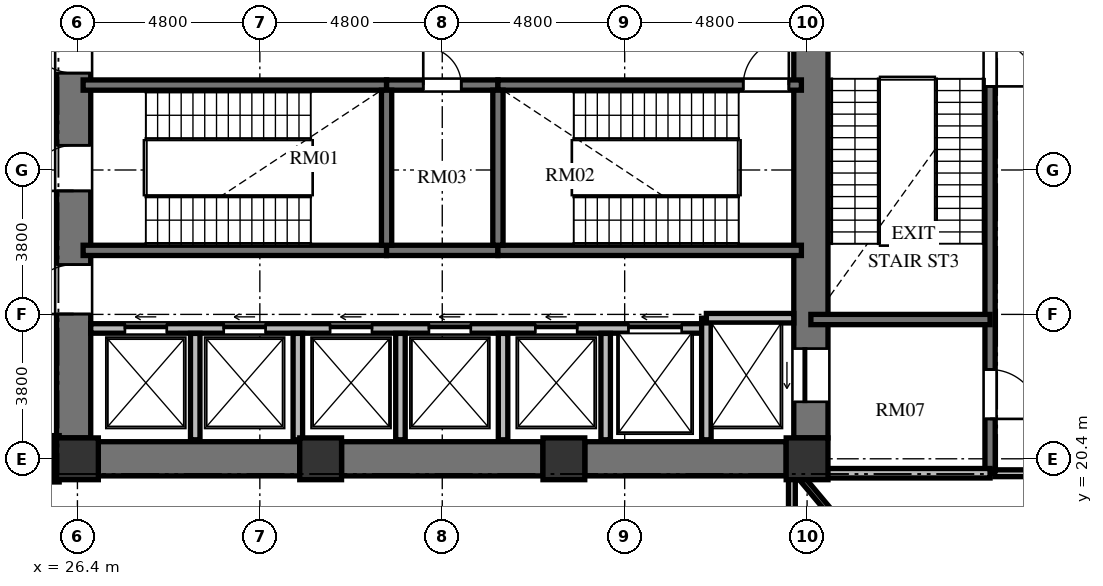
"""IFC4 building model, lengths in metres.
Left out: names, types, materials, properties, quantities, classifications, styles, units other than length and angle.
Written with IfcOpenShell. Run it as: python <this file> out.ifc"""

import sys

from ifc_helpers import new_model, si_unit, direction, frame, frame_2d, origin, origin_2d, place, context, subcontext, project, spatial, rectangle, extrude, element, fill, save


model = new_model("IFC4")
c1 = context("Model", 3, precision=1e-05, world=origin(), true_north=direction((0.0, 1.0)))
c2 = subcontext(c1, "Body", "Model", "MODEL_VIEW")
j1 = project(units=[si_unit("LENGTHUNIT", "METRE"), si_unit("PLANEANGLEUNIT", "RADIAN")], contexts=[c1])
p1 = place(None, origin())
s1 = spatial("IfcSite", under=j1, at=p1, CompositionType="ELEMENT")
p2 = place(p1, origin())
s2 = spatial("IfcBuilding", under=s1, at=p2, CompositionType="ELEMENT")
p3 = place(p2, frame((0.0, 0.0, 15.6)))
s3 = spatial("IfcBuildingStorey", under=s2, at=p3, CompositionType="ELEMENT", Elevation=15.6)
for number, where, z_axis, x_axis in (
    (1, (26.4, 20.4, 0.0), (0.0, 0.0, 1.0), (1.0, 0.0, 0.0)),
    (2, (32.8, 20.4, 0.0), (0.0, 0.0, 1.0), (1.0, 0.0, 0.0)),
    (3, (39.2, 20.4, 0.0), (0.0, 0.0, 1.0), (1.0, 0.0, 0.0)),
    (4, (45.6, 20.4, 0.0), (0.0, 0.0, 1.0), (1.0, 0.0, 0.0)),
):
    element("IfcColumn", number, at=place(p3, frame(where, z_axis=z_axis, x_axis=x_axis)), inside=s3, PredefinedType="COLUMN", context=c2, shape_type="SweptSolid", body=[
        extrude(rectangle(XDim=1.1, YDim=1.1, at=origin_2d()), origin(), (0.0, 0.0, 1.0), 4.8),
    ])
p4 = place(p3, frame((26.3, 20.95, 0.0), z_axis=(0.0, 0.0, 1.0), x_axis=(0.0, 1.0, 0.0)))
e5 = element("IfcWall", 5, at=p4, inside=s3, PredefinedType="SHEAR", context=c2, shape_type="SweptSolid", body=[
    extrude(rectangle(XDim=14.1, YDim=0.9, at=frame_2d((7.05, 0.0))), origin(), (0.0, 0.0, 1.0), 4.8),
])
p5 = place(p4, frame((6.5, 0.0, 0.0)))
e6 = element("IfcOpeningElement", 6, at=p5, cuts=e5, PredefinedType="OPENING", context=c2, shape_type="SweptSolid", body=[
    extrude(rectangle(XDim=1.2, YDim=2.15, at=frame_2d((0.6, 1.075))), frame((0.0, 0.46, 0.0), z_axis=(0.0, -1.0, 0.0), x_axis=(1.0, 0.0, 0.0)), (0.0, 0.0, 1.0), 0.92),
])
p6 = place(p4, frame((9.6, 0.0, 0.0)))
e7 = element("IfcOpeningElement", 7, at=p6, cuts=e5, PredefinedType="OPENING", context=c2, shape_type="SweptSolid", body=[
    extrude(rectangle(XDim=1.3, YDim=2.2, at=frame_2d((0.65, 1.1))), frame((0.0, 0.46, 0.0), z_axis=(0.0, -1.0, 0.0), x_axis=(1.0, 0.0, 0.0)), (0.0, 0.0, 1.0), 0.92),
])
p7 = place(p4, frame((3.26, 0.0, 0.0)))
e8 = element("IfcOpeningElement", 8, at=p7, cuts=e5, PredefinedType="OPENING", context=c2, shape_type="SweptSolid", body=[
    extrude(rectangle(XDim=1.3, YDim=2.2, at=frame_2d((0.65, 1.1))), frame((0.0, 0.46, 0.0), z_axis=(0.0, -1.0, 0.0), x_axis=(1.0, 0.0, 0.0)), (0.0, 0.0, 1.0), 0.92),
])
p8 = place(p3, frame((45.7, 20.95, 0.0), z_axis=(0.0, 0.0, 1.0), x_axis=(0.0, 1.0, 0.0)))
e9 = element("IfcWall", 9, at=p8, inside=s3, PredefinedType="SHEAR", context=c2, shape_type="SweptSolid", body=[
    extrude(rectangle(XDim=14.1, YDim=0.9, at=frame_2d((7.05, 0.0))), origin(), (0.0, 0.0, 1.0), 4.8),
])
p9 = place(p8, frame((11.75, 0.0, 0.0)))
e10 = element("IfcOpeningElement", 10, at=p9, cuts=e9, PredefinedType="OPENING", context=c2, shape_type="SweptSolid", body=[
    extrude(rectangle(XDim=1.4, YDim=2.3, at=frame_2d((0.7, 1.15))), frame((0.0, 0.46, 0.0), z_axis=(0.0, -1.0, 0.0), x_axis=(1.0, 0.0, 0.0)), (0.0, 0.0, 1.0), 0.92),
])
p10 = place(p8, frame((0.95, 0.0, 0.0)))
e11 = element("IfcOpeningElement", 11, at=p10, cuts=e9, PredefinedType="OPENING", context=c2, shape_type="SweptSolid", body=[
    extrude(rectangle(XDim=1.4, YDim=2.3, at=frame_2d((0.7, 1.15))), frame((0.0, 0.46, 0.0), z_axis=(0.0, -1.0, 0.0), x_axis=(1.0, 0.0, 0.0)), (0.0, 0.0, 1.0), 0.92),
])
p11 = place(p3, frame((26.95, 20.4, 0.0), z_axis=(0.0, 0.0, 1.0), x_axis=(1.0, 0.0, 0.0)))
e12 = element("IfcWall", 12, at=p11, inside=s3, PredefinedType="SHEAR", context=c2, shape_type="SweptSolid", body=[
    extrude(rectangle(XDim=5.3, YDim=0.9, at=frame_2d((2.65, 0.0))), origin(), (0.0, 0.0, 1.0), 4.8),
])
p12 = place(p3, frame((33.35, 20.4, 0.0), z_axis=(0.0, 0.0, 1.0), x_axis=(1.0, 0.0, 0.0)))
e13 = element("IfcWall", 13, at=p12, inside=s3, PredefinedType="SHEAR", context=c2, shape_type="SweptSolid", body=[
    extrude(rectangle(XDim=5.3, YDim=0.9, at=frame_2d((2.65, 0.0))), origin(), (0.0, 0.0, 1.0), 4.8),
])
p13 = place(p3, frame((39.75, 20.4, 0.0), z_axis=(0.0, 0.0, 1.0), x_axis=(1.0, 0.0, 0.0)))
e14 = element("IfcWall", 14, at=p13, inside=s3, PredefinedType="SHEAR", context=c2, shape_type="SweptSolid", body=[
    extrude(rectangle(XDim=5.3, YDim=0.9, at=frame_2d((2.65, 0.0))), origin(), (0.0, 0.0, 1.0), 4.8),
])
p14 = place(p3, frame((26.55, 30.235, 0.0), z_axis=(0.0, 0.0, 1.0), x_axis=(1.0, 0.0, 0.0)))
e15 = element("IfcWall", 15, at=p14, inside=s3, PredefinedType="SHEAR", context=c2, shape_type="SweptSolid", body=[
    extrude(rectangle(XDim=7.985, YDim=0.27, at=frame_2d((3.992, 0.0))), origin(), (0.0, 0.0, 1.0), 4.8),
])
p15 = place(p3, frame((34.535, 30.235, 0.0), z_axis=(0.0, 0.0, 1.0), x_axis=(1.0, 0.0, 0.0)))
e16 = element("IfcWall", 16, at=p15, inside=s3, PredefinedType="SHEAR", context=c2, shape_type="SweptSolid", body=[
    extrude(rectangle(XDim=2.93, YDim=0.27, at=frame_2d((1.465, 0.0))), origin(), (0.0, 0.0, 1.0), 4.8),
])
p16 = place(p15, frame((0.965, 0.0, 0.0)))
e17 = element("IfcOpeningElement", 17, at=p16, cuts=e16, PredefinedType="OPENING", context=c2, shape_type="SweptSolid", body=[
    extrude(rectangle(XDim=1.0, YDim=2.1, at=frame_2d((0.5, 1.05))), frame((0.0, 0.145, 0.0), z_axis=(0.0, -1.0, 0.0), x_axis=(1.0, 0.0, 0.0)), (0.0, 0.0, 1.0), 0.29),
])
p17 = place(p3, frame((37.465, 30.235, 0.0), z_axis=(0.0, 0.0, 1.0), x_axis=(1.0, 0.0, 0.0)))
e18 = element("IfcWall", 18, at=p17, inside=s3, PredefinedType="SHEAR", context=c2, shape_type="SweptSolid", body=[
    extrude(rectangle(XDim=7.985, YDim=0.27, at=frame_2d((3.992, 0.0))), origin(), (0.0, 0.0, 1.0), 4.8),
])
p18 = place(p17, frame((6.455, 0.0, 0.0)))
e19 = element("IfcOpeningElement", 19, at=p18, cuts=e18, PredefinedType="OPENING", context=c2, shape_type="SweptSolid", body=[
    extrude(rectangle(XDim=1.2, YDim=2.15, at=frame_2d((0.6, 1.075))), frame((0.0, 0.145, 0.0), z_axis=(0.0, -1.0, 0.0), x_axis=(1.0, 0.0, 0.0)), (0.0, 0.0, 1.0), 0.29),
])
p19 = place(p3, frame((26.55, 25.885, 0.0), z_axis=(0.0, 0.0, 1.0), x_axis=(1.0, 0.0, 0.0)))
e20 = element("IfcWall", 20, at=p19, inside=s3, PredefinedType="SHEAR", context=c2, shape_type="SweptSolid", body=[
    extrude(rectangle(XDim=7.985, YDim=0.27, at=frame_2d((3.992, 0.0))), origin(), (0.0, 0.0, 1.0), 4.8),
])
p20 = place(p3, frame((34.535, 25.885, 0.0), z_axis=(0.0, 0.0, 1.0), x_axis=(1.0, 0.0, 0.0)))
e21 = element("IfcWall", 21, at=p20, inside=s3, PredefinedType="SHEAR", context=c2, shape_type="SweptSolid", body=[
    extrude(rectangle(XDim=2.93, YDim=0.27, at=frame_2d((1.465, 0.0))), origin(), (0.0, 0.0, 1.0), 4.8),
])
p21 = place(p3, frame((37.465, 25.885, 0.0), z_axis=(0.0, 0.0, 1.0), x_axis=(1.0, 0.0, 0.0)))
e22 = element("IfcWall", 22, at=p21, inside=s3, PredefinedType="SHEAR", context=c2, shape_type="SweptSolid", body=[
    extrude(rectangle(XDim=7.985, YDim=0.27, at=frame_2d((3.992, 0.0))), origin(), (0.0, 0.0, 1.0), 4.8),
])
for number, where, z_axis, x_axis in (
    (23, (34.535, 26.02, 0.0), (0.0, 0.0, 1.0), (0.0, 1.0, 0.0)),
    (24, (37.465, 26.02, 0.0), (0.0, 0.0, 1.0), (0.0, 1.0, 0.0)),
):
    element("IfcWall", number, at=place(p3, frame(where, z_axis=z_axis, x_axis=x_axis)), inside=s3, PredefinedType="SHEAR", context=c2, shape_type="SweptSolid", body=[
        extrude(rectangle(XDim=4.08, YDim=0.27, at=frame_2d((2.04, 0.0))), origin(), (0.0, 0.0, 1.0), 4.8),
    ])
p22 = place(p3, frame((26.75, 23.83, 0.0), z_axis=(0.0, 0.0, 1.0), x_axis=(1.0, 0.0, 0.0)))
e25 = element("IfcWall", 25, at=p22, inside=s3, PredefinedType="SOLIDWALL", context=c2, shape_type="SweptSolid", body=[
    extrude(rectangle(XDim=16.2, YDim=0.25, at=frame_2d((8.1, 0.0))), origin(), (0.0, 0.0, 1.0), 4.52),
])
p23 = place(p22, frame((0.9, 0.0, 0.0)))
e26 = element("IfcOpeningElement", 26, at=p23, cuts=e25, PredefinedType="OPENING", context=c2, shape_type="SweptSolid", body=[
    extrude(rectangle(XDim=1.1, YDim=2.2, at=frame_2d((0.55, 1.1))), frame((0.0, 0.135, 0.0), z_axis=(0.0, -1.0, 0.0), x_axis=(1.0, 0.0, 0.0)), (0.0, 0.0, 1.0), 0.27),
])
p24 = place(p22, frame((3.5, 0.0, 0.0)))
e27 = element("IfcOpeningElement", 27, at=p24, cuts=e25, PredefinedType="OPENING", context=c2, shape_type="SweptSolid", body=[
    extrude(rectangle(XDim=1.1, YDim=2.2, at=frame_2d((0.55, 1.1))), frame((0.0, 0.135, 0.0), z_axis=(0.0, -1.0, 0.0), x_axis=(1.0, 0.0, 0.0)), (0.0, 0.0, 1.0), 0.27),
])
p25 = place(p22, frame((6.3, 0.0, 0.0)))
e28 = element("IfcOpeningElement", 28, at=p25, cuts=e25, PredefinedType="OPENING", context=c2, shape_type="SweptSolid", body=[
    extrude(rectangle(XDim=1.1, YDim=2.2, at=frame_2d((0.55, 1.1))), frame((0.0, 0.135, 0.0), z_axis=(0.0, -1.0, 0.0), x_axis=(1.0, 0.0, 0.0)), (0.0, 0.0, 1.0), 0.27),
])
p26 = place(p22, frame((8.9, 0.0, 0.0)))
e29 = element("IfcOpeningElement", 29, at=p26, cuts=e25, PredefinedType="OPENING", context=c2, shape_type="SweptSolid", body=[
    extrude(rectangle(XDim=1.1, YDim=2.2, at=frame_2d((0.55, 1.1))), frame((0.0, 0.135, 0.0), z_axis=(0.0, -1.0, 0.0), x_axis=(1.0, 0.0, 0.0)), (0.0, 0.0, 1.0), 0.27),
])
p27 = place(p22, frame((11.7, 0.0, 0.0)))
e30 = element("IfcOpeningElement", 30, at=p27, cuts=e25, PredefinedType="OPENING", context=c2, shape_type="SweptSolid", body=[
    extrude(rectangle(XDim=1.1, YDim=2.2, at=frame_2d((0.55, 1.1))), frame((0.0, 0.135, 0.0), z_axis=(0.0, -1.0, 0.0), x_axis=(1.0, 0.0, 0.0)), (0.0, 0.0, 1.0), 0.27),
])
p28 = place(p22, frame((14.15, 0.0, 0.0)))
e31 = element("IfcOpeningElement", 31, at=p28, cuts=e25, PredefinedType="OPENING", context=c2, shape_type="SweptSolid", body=[
    extrude(rectangle(XDim=1.4, YDim=2.3, at=frame_2d((0.7, 1.15))), frame((0.0, 0.135, 0.0), z_axis=(0.0, -1.0, 0.0), x_axis=(1.0, 0.0, 0.0)), (0.0, 0.0, 1.0), 0.27),
])
p29 = place(p3, frame((42.95, 20.9, 0.0), z_axis=(0.0, 0.0, 1.0), x_axis=(0.0, 1.0, 0.0)))
e32 = element("IfcWall", 32, at=p29, inside=s3, PredefinedType="SOLIDWALL", context=c2, shape_type="SweptSolid", body=[
    extrude(rectangle(XDim=3.2, YDim=0.25, at=frame_2d((1.6, 0.0))), origin(), (0.0, 0.0, 1.0), 4.52),
])
p30 = place(p3, frame((42.95, 24.1, 0.0), z_axis=(0.0, 0.0, 1.0), x_axis=(1.0, 0.0, 0.0)))
e33 = element("IfcWall", 33, at=p30, inside=s3, PredefinedType="SOLIDWALL", context=c2, shape_type="SweptSolid", body=[
    extrude(rectangle(XDim=2.3, YDim=0.25, at=frame_2d((1.15, 0.0))), origin(), (0.0, 0.0, 1.0), 4.52),
])
for number, where, z_axis, x_axis in (
    (34, (29.5, 20.9, 0.0), (0.0, 0.0, 1.0), (0.0, 1.0, 0.0)),
    (35, (32.2, 20.9, 0.0), (0.0, 0.0, 1.0), (0.0, 1.0, 0.0)),
    (36, (34.9, 20.9, 0.0), (0.0, 0.0, 1.0), (0.0, 1.0, 0.0)),
    (37, (37.6, 20.9, 0.0), (0.0, 0.0, 1.0), (0.0, 1.0, 0.0)),
    (38, (40.3, 20.9, 0.0), (0.0, 0.0, 1.0), (0.0, 1.0, 0.0)),
):
    element("IfcWall", number, at=place(p3, frame(where, z_axis=z_axis, x_axis=x_axis)), inside=s3, PredefinedType="SOLIDWALL", context=c2, shape_type="SweptSolid", body=[
        extrude(rectangle(XDim=2.8, YDim=0.25, at=frame_2d((1.4, 0.0))), origin(), (0.0, 0.0, 1.0), 4.52),
    ])
p31 = place(p3, frame((50.415, 35.845, 0.0), z_axis=(0.0, 0.0, 1.0), x_axis=(0.0, -1.0, 0.0)))
e39 = element("IfcWall", 39, at=p31, inside=s3, PredefinedType="SHEAR", context=c2, shape_type="SweptSolid", body=[
    extrude(rectangle(XDim=15.825, YDim=0.27, at=frame_2d((7.913, 0.0))), origin(), (0.0, 0.0, 1.0), 4.8),
])
p32 = place(p31, frame((4.445, 0.0, 0.0)))
e40 = element("IfcOpeningElement", 40, at=p32, cuts=e39, PredefinedType="OPENING", context=c2, shape_type="SweptSolid", body=[
    extrude(rectangle(XDim=1.2, YDim=2.15, at=frame_2d((0.6, 1.075))), frame((0.0, 0.145, 0.0), z_axis=(0.0, -1.0, 0.0), x_axis=(1.0, 0.0, 0.0)), (0.0, 0.0, 1.0), 0.29),
])
p33 = place(p31, frame((1.295, 0.0, 0.0)))
e41 = element("IfcOpeningElement", 41, at=p33, cuts=e39, PredefinedType="OPENING", context=c2, shape_type="SweptSolid", body=[
    extrude(rectangle(XDim=1.3, YDim=2.2, at=frame_2d((0.65, 1.1))), frame((0.0, 0.145, 0.0), z_axis=(0.0, -1.0, 0.0), x_axis=(1.0, 0.0, 0.0)), (0.0, 0.0, 1.0), 0.29),
])
p34 = place(p31, frame((13.095, 0.0, 0.0)))
e42 = element("IfcOpeningElement", 42, at=p34, cuts=e39, PredefinedType="OPENING", context=c2, shape_type="SweptSolid", body=[
    extrude(rectangle(XDim=1.3, YDim=2.2, at=frame_2d((0.65, 1.1))), frame((0.0, 0.145, 0.0), z_axis=(0.0, -1.0, 0.0), x_axis=(1.0, 0.0, 0.0)), (0.0, 0.0, 1.0), 0.29),
])
p35 = place(p3, frame((45.7, 24.065, 0.0), z_axis=(0.0, 0.0, 1.0), x_axis=(1.0, 0.0, 0.0)))
e43 = element("IfcWall", 43, at=p35, inside=s3, PredefinedType="SHEAR", context=c2, shape_type="SweptSolid", body=[
    extrude(rectangle(XDim=4.715, YDim=0.27, at=frame_2d((2.357, 0.0))), origin(), (0.0, 0.0, 1.0), 4.8),
])
p36 = place(p3, frame((45.7, 20.02, 0.0), z_axis=(0.0, 0.0, 1.0), x_axis=(1.0, 0.0, 0.0)))
e44 = element("IfcWall", 44, at=p36, inside=s3, PredefinedType="SOLIDWALL", context=c2, shape_type="SweptSolid", body=[
    extrude(rectangle(XDim=4.715, YDim=0.25, at=frame_2d((2.357, 0.0))), origin(), (0.0, 0.0, 1.0), 4.52),
])
p37 = place(p3, frame((53.19, 20.02, 0.0), z_axis=(0.0, 0.0, 1.0), x_axis=(-1.0, 0.0, 0.0)))
e45 = element("IfcWall", 45, at=p37, inside=s3, PredefinedType="PARTITIONING", context=c2, shape_type="SweptSolid", body=[
    extrude(rectangle(XDim=2.65, YDim=0.18, at=frame_2d((1.325, 0.0))), origin(), (0.0, 0.0, 1.0), 4.52),
])
p38 = place(p3, frame((25.83, 21.01, 0.0), z_axis=(0.0, 0.0, 1.0), x_axis=(0.0, -1.0, 0.0)))
e46 = element("IfcWall", 46, at=p38, inside=s3, PredefinedType="PARTITIONING", context=c2, shape_type="SweptSolid", body=[
    extrude(rectangle(XDim=1.22, YDim=0.18, at=frame_2d((0.61, 0.0))), origin(), (0.0, 0.0, 1.0), 4.52),
])
p39 = place(p3, frame((45.2, 19.91, 0.0), z_axis=(0.0, 0.0, 1.0), x_axis=(0.0, -1.0, 0.0)))
e47 = element("IfcWall", 47, at=p39, inside=s3, PredefinedType="PARTITIONING", context=c2, shape_type="SweptSolid", body=[
    extrude(rectangle(XDim=2.55, YDim=0.18, at=frame_2d((1.275, 0.0))), origin(), (0.0, 0.0, 1.0), 4.52),
])
p40 = place(p3, frame((45.407, 19.95, 0.0), z_axis=(0.0, 0.0, 1.0), x_axis=(0.641117276754, -0.767442921296, 0.0)))
e48 = element("IfcWall", 48, at=p40, inside=s3, PredefinedType="PARTITIONING", context=c2, shape_type="SweptSolid", body=[
    extrude(rectangle(XDim=11.681, YDim=0.15, at=frame_2d((5.84, 0.0))), origin(), (0.0, 0.0, 1.0), 3.805),
])
p41 = place(p5, origin())
e49 = element("IfcDoor", 49, at=p41, inside=s3, OperationType="SINGLE_SWING_LEFT", PredefinedType="DOOR", context=c2, shape_type="SweptSolid", body=[
    extrude(rectangle(XDim=1.2, YDim=2.15, at=frame_2d((0.6, 1.075))), frame((0.0, 0.025, 0.0), z_axis=(0.0, -1.0, 0.0), x_axis=(1.0, 0.0, 0.0)), (0.0, 0.0, 1.0), 0.05),
])
fill(e6, e49)
p42 = place(p18, origin())
e50 = element("IfcDoor", 50, at=p42, inside=s3, OperationType="SINGLE_SWING_RIGHT", PredefinedType="DOOR", context=c2, shape_type="SweptSolid", body=[
    extrude(rectangle(XDim=1.2, YDim=2.15, at=frame_2d((0.6, 1.075))), frame((0.0, 0.025, 0.0), z_axis=(0.0, -1.0, 0.0), x_axis=(1.0, 0.0, 0.0)), (0.0, 0.0, 1.0), 0.05),
])
fill(e19, e50)
p43 = place(p16, origin())
e51 = element("IfcDoor", 51, at=p43, inside=s3, OperationType="SINGLE_SWING_LEFT", PredefinedType="DOOR", context=c2, shape_type="SweptSolid", body=[
    extrude(rectangle(XDim=1.0, YDim=2.1, at=frame_2d((0.5, 1.05))), frame((0.0, 0.025, 0.0), z_axis=(0.0, -1.0, 0.0), x_axis=(1.0, 0.0, 0.0)), (0.0, 0.0, 1.0), 0.05),
])
fill(e17, e51)
p44 = place(p6, origin())
e52 = element("IfcDoor", 52, at=p44, inside=s3, OperationType="SINGLE_SWING_RIGHT", PredefinedType="DOOR", context=c2, shape_type="SweptSolid", body=[
    extrude(rectangle(XDim=1.3, YDim=2.2, at=frame_2d((0.65, 1.1))), frame((0.0, 0.025, 0.0), z_axis=(0.0, -1.0, 0.0), x_axis=(1.0, 0.0, 0.0)), (0.0, 0.0, 1.0), 0.05),
])
fill(e7, e52)
p45 = place(p7, origin())
e53 = element("IfcDoor", 53, at=p45, inside=s3, OperationType="SINGLE_SWING_LEFT", PredefinedType="DOOR", context=c2, shape_type="SweptSolid", body=[
    extrude(rectangle(XDim=1.3, YDim=2.2, at=frame_2d((0.65, 1.1))), frame((0.0, 0.025, 0.0), z_axis=(0.0, -1.0, 0.0), x_axis=(1.0, 0.0, 0.0)), (0.0, 0.0, 1.0), 0.05),
])
fill(e8, e53)
p46 = place(p23, origin())
e54 = element("IfcDoor", 54, at=p46, inside=s3, OperationType="SLIDING_TO_LEFT", PredefinedType="DOOR", context=c2, shape_type="SweptSolid", body=[
    extrude(rectangle(XDim=1.1, YDim=2.2, at=frame_2d((0.55, 1.1))), frame((0.0, 0.025, 0.0), z_axis=(0.0, -1.0, 0.0), x_axis=(1.0, 0.0, 0.0)), (0.0, 0.0, 1.0), 0.05),
])
fill(e26, e54)
p47 = place(p24, origin())
e55 = element("IfcDoor", 55, at=p47, inside=s3, OperationType="SLIDING_TO_LEFT", PredefinedType="DOOR", context=c2, shape_type="SweptSolid", body=[
    extrude(rectangle(XDim=1.1, YDim=2.2, at=frame_2d((0.55, 1.1))), frame((0.0, 0.025, 0.0), z_axis=(0.0, -1.0, 0.0), x_axis=(1.0, 0.0, 0.0)), (0.0, 0.0, 1.0), 0.05),
])
fill(e27, e55)
p48 = place(p25, origin())
e56 = element("IfcDoor", 56, at=p48, inside=s3, OperationType="SLIDING_TO_LEFT", PredefinedType="DOOR", context=c2, shape_type="SweptSolid", body=[
    extrude(rectangle(XDim=1.1, YDim=2.2, at=frame_2d((0.55, 1.1))), frame((0.0, 0.025, 0.0), z_axis=(0.0, -1.0, 0.0), x_axis=(1.0, 0.0, 0.0)), (0.0, 0.0, 1.0), 0.05),
])
fill(e28, e56)
p49 = place(p26, origin())
e57 = element("IfcDoor", 57, at=p49, inside=s3, OperationType="SLIDING_TO_LEFT", PredefinedType="DOOR", context=c2, shape_type="SweptSolid", body=[
    extrude(rectangle(XDim=1.1, YDim=2.2, at=frame_2d((0.55, 1.1))), frame((0.0, 0.025, 0.0), z_axis=(0.0, -1.0, 0.0), x_axis=(1.0, 0.0, 0.0)), (0.0, 0.0, 1.0), 0.05),
])
fill(e29, e57)
p50 = place(p27, origin())
e58 = element("IfcDoor", 58, at=p50, inside=s3, OperationType="SLIDING_TO_LEFT", PredefinedType="DOOR", context=c2, shape_type="SweptSolid", body=[
    extrude(rectangle(XDim=1.1, YDim=2.2, at=frame_2d((0.55, 1.1))), frame((0.0, 0.025, 0.0), z_axis=(0.0, -1.0, 0.0), x_axis=(1.0, 0.0, 0.0)), (0.0, 0.0, 1.0), 0.05),
])
fill(e30, e58)
p51 = place(p10, origin())
e59 = element("IfcDoor", 59, at=p51, inside=s3, OperationType="SLIDING_TO_LEFT", PredefinedType="DOOR", context=c2, shape_type="SweptSolid", body=[
    extrude(rectangle(XDim=1.4, YDim=2.3, at=frame_2d((0.7, 1.15))), frame((0.0, 0.025, 0.0), z_axis=(0.0, -1.0, 0.0), x_axis=(1.0, 0.0, 0.0)), (0.0, 0.0, 1.0), 0.05),
])
fill(e11, e59)
p52 = place(p28, origin())
e60 = element("IfcDoor", 60, at=p52, inside=s3, OperationType="SLIDING_TO_LEFT", PredefinedType="DOOR", context=c2, shape_type="SweptSolid", body=[
    extrude(rectangle(XDim=1.4, YDim=2.3, at=frame_2d((0.7, 1.15))), frame((0.0, 0.025, 0.0), z_axis=(0.0, -1.0, 0.0), x_axis=(1.0, 0.0, 0.0)), (0.0, 0.0, 1.0), 0.05),
])
fill(e31, e60)
p53 = place(p32, origin())
e61 = element("IfcDoor", 61, at=p53, inside=s3, OperationType="SINGLE_SWING_RIGHT", PredefinedType="DOOR", context=c2, shape_type="SweptSolid", body=[
    extrude(rectangle(XDim=1.2, YDim=2.15, at=frame_2d((0.6, 1.075))), frame((0.0, 0.025, 0.0), z_axis=(0.0, -1.0, 0.0), x_axis=(1.0, 0.0, 0.0)), (0.0, 0.0, 1.0), 0.05),
])
fill(e40, e61)
p54 = place(p34, origin())
e62 = element("IfcDoor", 62, at=p54, inside=s3, OperationType="SINGLE_SWING_RIGHT", PredefinedType="DOOR", context=c2, shape_type="SweptSolid", body=[
    extrude(rectangle(XDim=1.3, YDim=2.2, at=frame_2d((0.65, 1.1))), frame((0.0, 0.025, 0.0), z_axis=(0.0, -1.0, 0.0), x_axis=(1.0, 0.0, 0.0)), (0.0, 0.0, 1.0), 0.05),
])
fill(e42, e62)
save(model, sys.argv[1])
